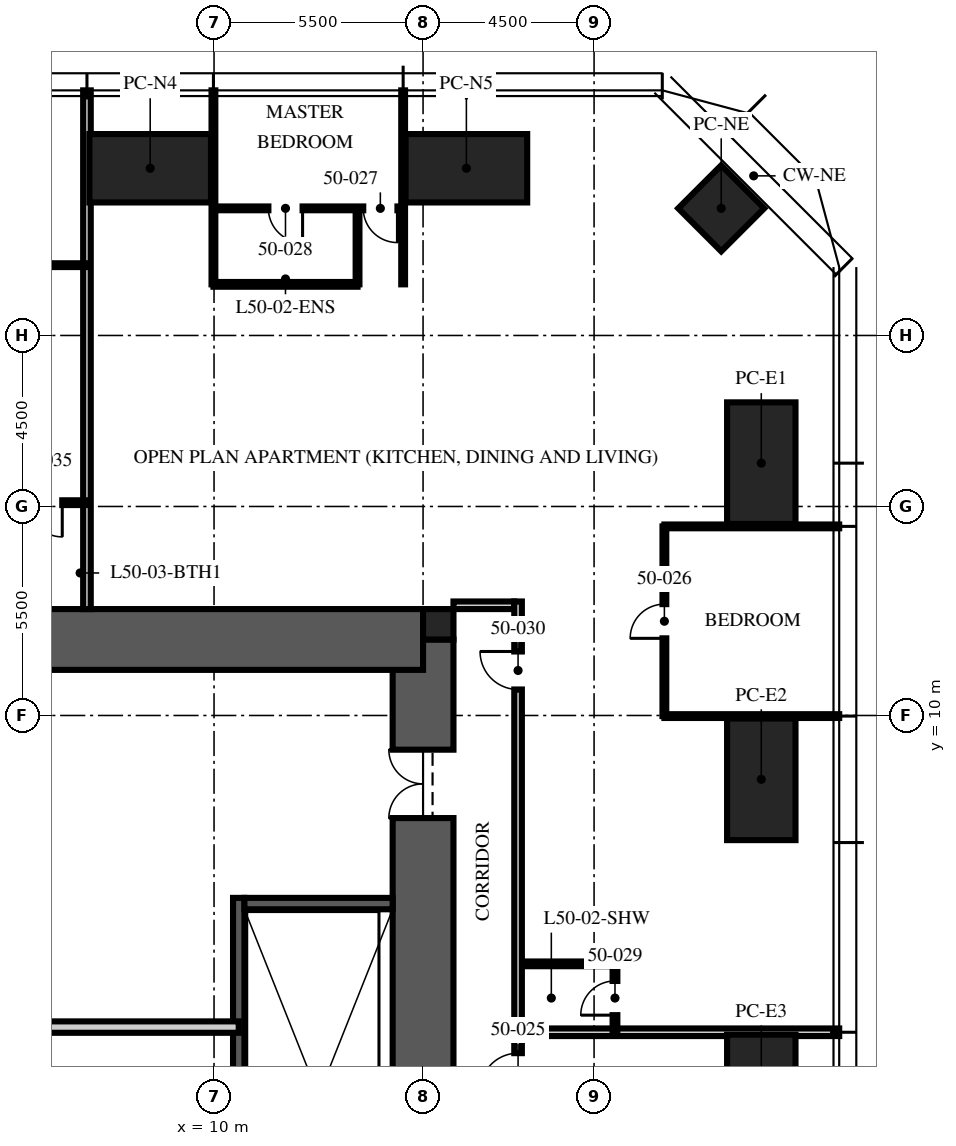
"""IFC4 building model, lengths in metres.
Left out: names, types, materials, properties, quantities, classifications, styles, units other than length and angle.
Written with IfcOpenShell. Run it as: python <this file> out.ifc"""

import sys

from ifc_helpers import new_model, si_unit, direction, frame, frame_2d, origin, origin_2d, place, context, subcontext, project, spatial, rectangle, hollow_rectangle, extrude, element, fill, save


model = new_model("IFC4")
c1 = context("Model", 3, precision=1e-05, world=origin(), true_north=direction((0.0, 1.0)))
c2 = subcontext(c1, "Body", "Model", "MODEL_VIEW")
j1 = project(units=[si_unit("LENGTHUNIT", "METRE"), si_unit("PLANEANGLEUNIT", "RADIAN")], contexts=[c1])
p1 = place(None, origin())
s1 = spatial("IfcSite", under=j1, at=p1, CompositionType="ELEMENT")
p2 = place(p1, origin())
s2 = spatial("IfcBuilding", under=s1, at=p2, CompositionType="ELEMENT")
p3 = place(p2, frame((0.0, 0.0, 203.25)))
s3 = spatial("IfcBuildingStorey", under=s2, at=p3, CompositionType="ELEMENT", Elevation=203.25)
p4 = place(p3, frame((15.5, -12.0, -0.25), z_axis=(0.0, 0.0, 1.0), x_axis=(0.0, 1.0, 0.0)))
e1 = element("IfcWall", 1, at=p4, inside=s3, PredefinedType="SHEAR", context=c2, shape_type="SweptSolid", body=[
    extrude(rectangle(XDim=24.0, YDim=1.6, at=frame_2d((12.0, 0.0))), origin(), (0.0, 0.0, 1.0), 3.75),
])
p5 = place(p4, frame((3.2, 0.0, 0.25)))
e2 = element("IfcOpeningElement", 2, at=p5, cuts=e1, PredefinedType="OPENING", context=c2, shape_type="SweptSolid", body=[
    extrude(rectangle(XDim=1.2, YDim=2.1, at=frame_2d((0.6, 1.05))), frame((0.0, 0.81, 0.0), z_axis=(0.0, -1.0, 0.0), x_axis=(1.0, 0.0, 0.0)), (0.0, 0.0, 1.0), 1.62),
])
p6 = place(p4, frame((19.3, 0.0, 0.25)))
e3 = element("IfcOpeningElement", 3, at=p6, cuts=e1, PredefinedType="OPENING", context=c2, shape_type="SweptSolid", body=[
    extrude(rectangle(XDim=1.8, YDim=2.1, at=frame_2d((0.9, 1.05))), frame((0.0, 0.81, 0.0), z_axis=(0.0, -1.0, 0.0), x_axis=(1.0, 0.0, 0.0)), (0.0, 0.0, 1.0), 1.62),
])
p7 = place(p3, frame((-15.5, 12.0, -0.25), z_axis=(0.0, 0.0, 1.0), x_axis=(1.0, 0.0, 0.0)))
e4 = element("IfcWall", 4, at=p7, inside=s3, PredefinedType="SHEAR", context=c2, shape_type="SweptSolid", body=[
    extrude(rectangle(XDim=31.0, YDim=1.6, at=frame_2d((15.5, 0.0))), origin(), (0.0, 0.0, 1.0), 3.75),
])
p8 = place(p3, frame((15.9, 12.4, -0.25), z_axis=(0.0, 0.0, 1.0), x_axis=(1.0, 0.0, 0.0)))
e5 = element("IfcColumn", 5, at=p8, inside=s3, PredefinedType="COLUMN", context=c2, shape_type="SweptSolid", body=[
    extrude(rectangle(XDim=0.8, YDim=0.8, at=origin_2d()), origin(), (0.0, 0.0, 1.0), 3.75),
])
for number, where, z_axis, x_axis in (
    (6, (8.32, 24.4, 0.0), (0.0, 0.0, 1.0), (1.0, 0.0, 0.0)),
    (7, (16.64, 24.4, 0.0), (0.0, 0.0, 1.0), (1.0, 0.0, 0.0)),
    (8, (24.4, 16.64, 0.0), (0.0, 0.0, 1.0), (0.0, 1.0, 0.0)),
    (9, (24.4, 8.32, 0.0), (0.0, 0.0, 1.0), (0.0, 1.0, 0.0)),
    (10, (24.4, 0.0, 0.0), (0.0, 0.0, 1.0), (0.0, 1.0, 0.0)),
):
    element("IfcColumn", number, at=place(p3, frame(where, z_axis=z_axis, x_axis=x_axis)), inside=s3, PredefinedType="COLUMN", context=c2, shape_type="SweptSolid", body=[
        extrude(hollow_rectangle(XDim=3.2, YDim=1.8, WallThickness=0.2, at=origin_2d()), origin(), (0.0, 0.0, 1.0), 3.75),
    ])
p9 = place(p3, frame((23.346, 23.346, 0.0), z_axis=(0.0, 0.0, 1.0), x_axis=(0.707106781187, -0.707106781187, 0.0)))
e11 = element("IfcColumn", 11, at=p9, inside=s3, PredefinedType="COLUMN", context=c2, shape_type="SweptSolid", body=[
    extrude(hollow_rectangle(XDim=1.6, YDim=1.6, WallThickness=0.1, at=origin_2d()), origin(), (0.0, 0.0, 1.0), 3.75),
])
p10 = place(p3, frame((10.65, -4.9, 0.0), z_axis=(0.0, 0.0, 1.0), x_axis=(0.0, 1.0, 0.0)))
e12 = element("IfcWall", 12, at=p10, inside=s3, PredefinedType="SOLIDWALL", context=c2, shape_type="SweptSolid", body=[
    extrude(rectangle(XDim=10.1, YDim=0.3, at=frame_2d((5.05, 0.0))), origin(), (0.0, 0.0, 1.0), 3.5),
])
p11 = place(p3, frame((14.7, 5.05, 0.0), z_axis=(0.0, 0.0, 1.0), x_axis=(-1.0, 0.0, 0.0)))
e13 = element("IfcWall", 13, at=p11, inside=s3, PredefinedType="SOLIDWALL", context=c2, shape_type="SweptSolid", body=[
    extrude(rectangle(XDim=3.9, YDim=0.3, at=frame_2d((1.95, 0.0))), origin(), (0.0, 0.0, 1.0), 3.5),
])
p12 = place(p3, frame((-10.65, 1.8, 0.0), z_axis=(0.0, 0.0, 1.0), x_axis=(1.0, 0.0, 0.0)))
e14 = element("IfcWall", 14, at=p12, inside=s3, PredefinedType="PARTITIONING", context=c2, shape_type="SweptSolid", body=[
    extrude(rectangle(XDim=21.3, YDim=0.3, at=frame_2d((10.65, 0.0))), origin(), (0.0, 0.0, 1.0), 3.5),
])
p13 = place(p12, frame((10.05, 0.0, 0.0)))
e15 = element("IfcOpeningElement", 15, at=p13, cuts=e14, PredefinedType="OPENING", context=c2, shape_type="SweptSolid", body=[
    extrude(rectangle(XDim=1.2, YDim=2.1, at=frame_2d((0.6, 1.05))), frame((0.0, 0.16, 0.0), z_axis=(0.0, -1.0, 0.0), x_axis=(1.0, 0.0, 0.0)), (0.0, 0.0, 1.0), 0.32),
])
p14 = place(p12, frame((0.938, 0.0, 0.0)))
e16 = element("IfcOpeningElement", 16, at=p14, cuts=e14, PredefinedType="OPENING", context=c2, shape_type="SweptSolid", body=[
    extrude(rectangle(XDim=0.9, YDim=2.1, at=frame_2d((0.45, 1.05))), frame((0.0, 0.16, 0.0), z_axis=(0.0, -1.0, 0.0), x_axis=(1.0, 0.0, 0.0)), (0.0, 0.0, 1.0), 0.32),
])
p15 = place(p3, frame((16.3, 12.9, 0.0), z_axis=(0.0, 0.0, 1.0), x_axis=(1.0, 0.0, 0.0)))
e17 = element("IfcWall", 17, at=p15, inside=s3, PredefinedType="PARTITIONING", context=c2, shape_type="SweptSolid", body=[
    extrude(rectangle(XDim=1.6, YDim=0.2, at=frame_2d((0.8, 0.0))), origin(), (0.0, 0.0, 1.0), 2.3),
])
p16 = place(p3, frame((18.1, 1.664, 0.0), z_axis=(0.0, 0.0, 1.0), x_axis=(1.0, 0.0, 0.0)))
e18 = element("IfcWall", 18, at=p16, inside=s3, PredefinedType="PARTITIONING", context=c2, shape_type="SweptSolid", body=[
    extrude(rectangle(XDim=8.35, YDim=0.2, at=frame_2d((4.175, 0.0))), origin(), (0.0, 0.0, 1.0), 2.91),
])
for number, where, z_axis, x_axis in (
    (19, (21.85, 9.984, 0.0), (0.0, 0.0, 1.0), (1.0, 0.0, 0.0)),
    (20, (21.85, 14.976, 0.0), (0.0, 0.0, 1.0), (1.0, 0.0, 0.0)),
):
    element("IfcWall", number, at=place(p3, frame(where, z_axis=z_axis, x_axis=x_axis)), inside=s3, PredefinedType="PARTITIONING", context=c2, shape_type="SweptSolid", body=[
        extrude(rectangle(XDim=4.6, YDim=0.1, at=frame_2d((2.3, 0.0))), origin(), (0.0, 0.0, 1.0), 2.91),
    ])
for number, where, z_axis, x_axis in (
    (21, (14.976, 21.345, 0.0), (0.0, 0.0, 1.0), (0.0, 1.0, 0.0)),
    (22, (9.984, 21.345, 0.0), (0.0, 0.0, 1.0), (0.0, 1.0, 0.0)),
):
    element("IfcWall", number, at=place(p3, frame(where, z_axis=z_axis, x_axis=x_axis)), inside=s3, PredefinedType="PARTITIONING", context=c2, shape_type="SweptSolid", body=[
        extrude(rectangle(XDim=5.105, YDim=0.1, at=frame_2d((2.552, 0.0))), origin(), (0.0, 0.0, 1.0), 2.91),
    ])
p17 = place(p3, frame((6.656, 12.8, 0.0), z_axis=(0.0, 0.0, 1.0), x_axis=(0.0, 1.0, 0.0)))
e23 = element("IfcWall", 23, at=p17, inside=s3, PredefinedType="PARTITIONING", context=c2, shape_type="SweptSolid", body=[
    extrude(rectangle(XDim=13.65, YDim=0.2, at=frame_2d((6.825, 0.0))), origin(), (0.0, 0.0, 1.0), 2.91),
])
p18 = place(p3, frame((21.85, 9.984, 0.0), z_axis=(0.0, 0.0, 1.0), x_axis=(0.0, 1.0, 0.0)))
e24 = element("IfcWall", 24, at=p18, inside=s3, PredefinedType="PARTITIONING", context=c2, shape_type="SweptSolid", body=[
    extrude(rectangle(XDim=4.992, YDim=0.1, at=frame_2d((2.496, 0.0))), origin(), (0.0, 0.0, 1.0), 2.81),
])
p19 = place(p18, frame((2.046, 0.0, 0.0)))
e25 = element("IfcOpeningElement", 25, at=p19, cuts=e24, PredefinedType="OPENING", context=c2, shape_type="SweptSolid", body=[
    extrude(rectangle(XDim=0.9, YDim=2.1, at=frame_2d((0.45, 1.05))), frame((0.0, 0.06, 0.0), z_axis=(0.0, -1.0, 0.0), x_axis=(1.0, 0.0, 0.0)), (0.0, 0.0, 1.0), 0.12),
])
p20 = place(p3, frame((14.976, 23.345, 0.0), z_axis=(0.0, 0.0, 1.0), x_axis=(-1.0, 0.0, 0.0)))
e26 = element("IfcWall", 26, at=p20, inside=s3, PredefinedType="PARTITIONING", context=c2, shape_type="SweptSolid", body=[
    extrude(rectangle(XDim=4.992, YDim=0.1, at=frame_2d((2.496, 0.0))), origin(), (0.0, 0.0, 1.0), 2.81),
])
p21 = place(p20, frame((0.15, 0.0, 0.0)))
e27 = element("IfcOpeningElement", 27, at=p21, cuts=e26, PredefinedType="OPENING", context=c2, shape_type="SweptSolid", body=[
    extrude(rectangle(XDim=0.9, YDim=2.1, at=frame_2d((0.45, 1.05))), frame((0.0, 0.06, 0.0), z_axis=(0.0, -1.0, 0.0), x_axis=(1.0, 0.0, 0.0)), (0.0, 0.0, 1.0), 0.12),
])
p22 = place(p20, frame((2.646, 0.0, 0.0)))
e28 = element("IfcOpeningElement", 28, at=p22, cuts=e26, PredefinedType="OPENING", context=c2, shape_type="SweptSolid", body=[
    extrude(rectangle(XDim=0.9, YDim=2.1, at=frame_2d((0.45, 1.05))), frame((0.0, 0.06, 0.0), z_axis=(0.0, -1.0, 0.0), x_axis=(1.0, 0.0, 0.0)), (0.0, 0.0, 1.0), 0.12),
])
p23 = place(p3, frame((13.776, 21.345, 0.0), z_axis=(0.0, 0.0, 1.0), x_axis=(0.0, 1.0, 0.0)))
e29 = element("IfcWall", 29, at=p23, inside=s3, PredefinedType="PARTITIONING", context=c2, shape_type="SweptSolid", body=[
    extrude(rectangle(XDim=2.0, YDim=0.1, at=frame_2d((1.0, 0.0))), origin(), (0.0, 0.0, 1.0), 3.5),
])
p24 = place(p3, frame((13.776, 21.345, 0.0), z_axis=(0.0, 0.0, 1.0), x_axis=(-1.0, 0.0, 0.0)))
e30 = element("IfcWall", 30, at=p24, inside=s3, PredefinedType="PARTITIONING", context=c2, shape_type="SweptSolid", body=[
    extrude(rectangle(XDim=3.792, YDim=0.125, at=frame_2d((1.896, 0.0))), origin(), (0.0, 0.0, 1.0), 2.81),
])
p25 = place(p3, frame((20.55, 1.664, 0.0), z_axis=(0.0, 0.0, 1.0), x_axis=(0.0, 1.0, 0.0)))
e31 = element("IfcWall", 31, at=p25, inside=s3, PredefinedType="PARTITIONING", context=c2, shape_type="SweptSolid", body=[
    extrude(rectangle(XDim=1.8, YDim=0.125, at=frame_2d((0.9, 0.0))), origin(), (0.0, 0.0, 1.0), 3.5),
])
p26 = place(p25, frame((0.45, 0.0, 0.0)))
e32 = element("IfcOpeningElement", 32, at=p26, cuts=e31, PredefinedType="OPENING", context=c2, shape_type="SweptSolid", body=[
    extrude(rectangle(XDim=0.9, YDim=2.1, at=frame_2d((0.45, 1.05))), frame((0.0, 0.073, 0.0), z_axis=(0.0, -1.0, 0.0), x_axis=(1.0, 0.0, 0.0)), (0.0, 0.0, 1.0), 0.145),
])
p27 = place(p3, frame((18.1, 3.464, 0.0), z_axis=(0.0, 0.0, 1.0), x_axis=(1.0, 0.0, 0.0)))
e33 = element("IfcWall", 33, at=p27, inside=s3, PredefinedType="PARTITIONING", context=c2, shape_type="SweptSolid", body=[
    extrude(rectangle(XDim=2.45, YDim=0.125, at=frame_2d((1.225, 0.0))), origin(), (0.0, 0.0, 1.0), 3.5),
])
p28 = place(p3, frame((6.656, 21.85, 0.0), z_axis=(0.0, 0.0, 1.0), x_axis=(-1.0, 0.0, 0.0)))
e34 = element("IfcWall", 34, at=p28, inside=s3, PredefinedType="PARTITIONING", context=c2, shape_type="SweptSolid", body=[
    extrude(rectangle(XDim=4.992, YDim=0.1, at=frame_2d((2.496, 0.0))), origin(), (0.0, 0.0, 1.0), 2.81),
])
p29 = place(p28, frame((2.046, 0.0, 0.0)))
e35 = element("IfcOpeningElement", 35, at=p29, cuts=e34, PredefinedType="OPENING", context=c2, shape_type="SweptSolid", body=[
    extrude(rectangle(XDim=0.9, YDim=2.1, at=frame_2d((0.45, 1.05))), frame((0.0, 0.06, 0.0), z_axis=(0.0, -1.0, 0.0), x_axis=(1.0, 0.0, 0.0)), (0.0, 0.0, 1.0), 0.12),
])
p30 = place(p3, frame((6.656, 15.6, 0.0), z_axis=(0.0, 0.0, 1.0), x_axis=(-1.0, 0.0, 0.0)))
e36 = element("IfcWall", 36, at=p30, inside=s3, PredefinedType="PARTITIONING", context=c2, shape_type="SweptSolid", body=[
    extrude(rectangle(XDim=2.2, YDim=0.125, at=frame_2d((1.1, 0.0))), origin(), (0.0, 0.0, 1.0), 3.5),
])
p31 = place(p30, frame((0.65, 0.0, 0.0)))
e37 = element("IfcOpeningElement", 37, at=p31, cuts=e36, PredefinedType="OPENING", context=c2, shape_type="SweptSolid", body=[
    extrude(rectangle(XDim=0.9, YDim=2.1, at=frame_2d((0.45, 1.05))), frame((0.0, 0.073, 0.0), z_axis=(0.0, -1.0, 0.0), x_axis=(1.0, 0.0, 0.0)), (0.0, 0.0, 1.0), 0.145),
])
p32 = place(p3, frame((18.0, -13.0, 0.0), z_axis=(0.0, 0.0, 1.0), x_axis=(0.0, 1.0, 0.0)))
e38 = element("IfcWall", 38, at=p32, inside=s3, PredefinedType="PARTITIONING", context=c2, shape_type="SweptSolid", body=[
    extrude(rectangle(XDim=26.0, YDim=0.2, at=frame_2d((13.0, 0.0))), origin(), (0.0, 0.0, 1.0), 2.6),
])
p33 = place(p32, frame((13.114, 0.0, 0.0)))
e39 = element("IfcOpeningElement", 39, at=p33, cuts=e38, PredefinedType="OPENING", context=c2, shape_type="SweptSolid", body=[
    extrude(rectangle(XDim=1.0, YDim=2.2, at=frame_2d((0.5, 1.1))), frame((0.0, 0.11, 0.0), z_axis=(0.0, -1.0, 0.0), x_axis=(1.0, 0.0, 0.0)), (0.0, 0.0, 1.0), 0.22),
])
p34 = place(p32, frame((23.684, 0.0, 0.0)))
e40 = element("IfcOpeningElement", 40, at=p34, cuts=e38, PredefinedType="OPENING", context=c2, shape_type="SweptSolid", body=[
    extrude(rectangle(XDim=1.0, YDim=2.2, at=frame_2d((0.5, 1.1))), frame((0.0, 0.11, 0.0), z_axis=(0.0, -1.0, 0.0), x_axis=(1.0, 0.0, 0.0)), (0.0, 0.0, 1.0), 0.22),
])
p35 = place(p32, frame((4.6, 0.0, 0.0)))
e41 = element("IfcOpeningElement", 41, at=p35, cuts=e38, PredefinedType="OPENING", context=c2, shape_type="SweptSolid", body=[
    extrude(rectangle(XDim=1.0, YDim=2.2, at=frame_2d((0.5, 1.1))), frame((0.0, 0.11, 0.0), z_axis=(0.0, -1.0, 0.0), x_axis=(1.0, 0.0, 0.0)), (0.0, 0.0, 1.0), 0.22),
])
p36 = place(p6, origin())
e42 = element("IfcDoor", 42, at=p36, inside=s3, OperationType="DOUBLE_DOOR_SINGLE_SWING", PredefinedType="DOOR", context=c2, shape_type="SweptSolid", body=[
    extrude(rectangle(XDim=1.8, YDim=2.1, at=frame_2d((0.9, 1.05))), frame((0.0, 0.025, 0.0), z_axis=(0.0, -1.0, 0.0), x_axis=(1.0, 0.0, 0.0)), (0.0, 0.0, 1.0), 0.05),
])
fill(e3, e42)
p37 = place(p33, origin())
e43 = element("IfcDoor", 43, at=p37, inside=s3, OperationType="SINGLE_SWING_LEFT", PredefinedType="DOOR", context=c2, shape_type="SweptSolid", body=[
    extrude(rectangle(XDim=1.0, YDim=2.2, at=frame_2d((0.5, 1.1))), frame((0.0, 0.025, 0.0), z_axis=(0.0, -1.0, 0.0), x_axis=(1.0, 0.0, 0.0)), (0.0, 0.0, 1.0), 0.05),
])
fill(e39, e43)
p38 = place(p19, origin())
e44 = element("IfcDoor", 44, at=p38, inside=s3, OperationType="SINGLE_SWING_LEFT", PredefinedType="DOOR", context=c2, shape_type="SweptSolid", body=[
    extrude(rectangle(XDim=0.9, YDim=2.1, at=frame_2d((0.45, 1.05))), frame((0.0, 0.025, 0.0), z_axis=(0.0, -1.0, 0.0), x_axis=(1.0, 0.0, 0.0)), (0.0, 0.0, 1.0), 0.05),
])
fill(e25, e44)
p39 = place(p21, origin())
e45 = element("IfcDoor", 45, at=p39, inside=s3, OperationType="SINGLE_SWING_LEFT", PredefinedType="DOOR", context=c2, shape_type="SweptSolid", body=[
    extrude(rectangle(XDim=0.9, YDim=2.1, at=frame_2d((0.45, 1.05))), frame((0.0, 0.025, 0.0), z_axis=(0.0, -1.0, 0.0), x_axis=(1.0, 0.0, 0.0)), (0.0, 0.0, 1.0), 0.05),
])
fill(e27, e45)
p40 = place(p22, origin())
e46 = element("IfcDoor", 46, at=p40, inside=s3, OperationType="SINGLE_SWING_LEFT", PredefinedType="DOOR", context=c2, shape_type="SweptSolid", body=[
    extrude(rectangle(XDim=0.9, YDim=2.1, at=frame_2d((0.45, 1.05))), frame((0.0, 0.025, 0.0), z_axis=(0.0, -1.0, 0.0), x_axis=(1.0, 0.0, 0.0)), (0.0, 0.0, 1.0), 0.05),
])
fill(e28, e46)
p41 = place(p26, origin())
e47 = element("IfcDoor", 47, at=p41, inside=s3, OperationType="SINGLE_SWING_LEFT", PredefinedType="DOOR", context=c2, shape_type="SweptSolid", body=[
    extrude(rectangle(XDim=0.9, YDim=2.1, at=frame_2d((0.45, 1.05))), frame((0.0, 0.025, 0.0), z_axis=(0.0, -1.0, 0.0), x_axis=(1.0, 0.0, 0.0)), (0.0, 0.0, 1.0), 0.05),
])
fill(e32, e47)
p42 = place(p34, origin())
e48 = element("IfcDoor", 48, at=p42, inside=s3, OperationType="SINGLE_SWING_RIGHT", PredefinedType="DOOR", context=c2, shape_type="SweptSolid", body=[
    extrude(rectangle(XDim=1.0, YDim=2.2, at=frame_2d((0.5, 1.1))), frame((0.0, 0.025, 0.0), z_axis=(0.0, -1.0, 0.0), x_axis=(1.0, 0.0, 0.0)), (0.0, 0.0, 1.0), 0.05),
])
fill(e40, e48)
p43 = place(p31, origin())
e49 = element("IfcDoor", 49, at=p43, inside=s3, OperationType="SINGLE_SWING_LEFT", PredefinedType="DOOR", context=c2, shape_type="SweptSolid", body=[
    extrude(rectangle(XDim=0.9, YDim=2.1, at=frame_2d((0.45, 1.05))), frame((0.0, 0.025, 0.0), z_axis=(0.0, -1.0, 0.0), x_axis=(1.0, 0.0, 0.0)), (0.0, 0.0, 1.0), 0.05),
])
fill(e37, e49)
save(model, sys.argv[1])
